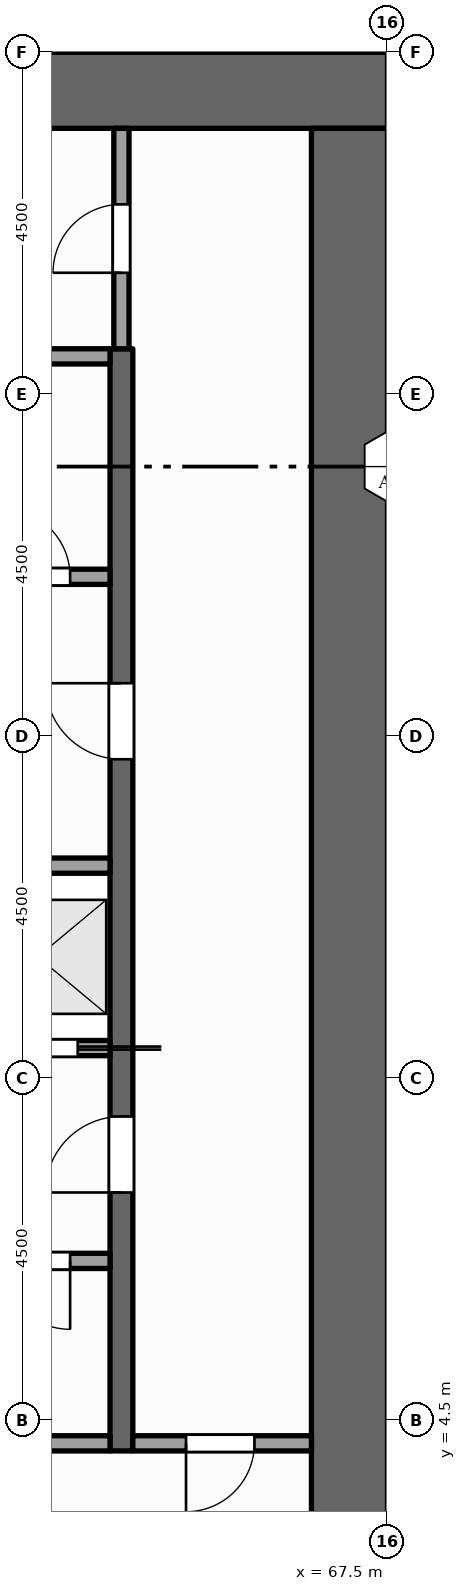
"""IFC4 building model, lengths in metres.
Left out: names, types, materials, properties, quantities, classifications, styles, units other than length and angle.
Written with IfcOpenShell. Run it as: python <this file> out.ifc"""

import sys

from ifc_helpers import new_model, si_unit, direction, frame, frame_2d, origin, place, context, subcontext, project, spatial, rectangle, extrude, element, fill, save


model = new_model("IFC4")
c1 = context("Model", 3, precision=1e-05, world=origin(), true_north=direction((0.0, 1.0)))
c2 = subcontext(c1, "Body", "Model", "MODEL_VIEW")
j1 = project(units=[si_unit("LENGTHUNIT", "METRE"), si_unit("PLANEANGLEUNIT", "RADIAN")], contexts=[c1])
p1 = place(None, origin())
s1 = spatial("IfcSite", under=j1, at=p1, CompositionType="ELEMENT")
p2 = place(p1, origin())
s2 = spatial("IfcBuilding", under=s1, at=p2, CompositionType="ELEMENT")
p3 = place(p2, frame((0.0, 0.0, 195.0)))
s3 = spatial("IfcBuildingStorey", under=s2, at=p3, CompositionType="ELEMENT", Elevation=195.0)
p4 = place(p3, frame((54.0, 22.0, -0.15), z_axis=(0.0, 0.0, 1.0), x_axis=(1.0, 0.0, 0.0)))
e1 = element("IfcWall", 1, at=p4, inside=s3, PredefinedType="SHEAR", context=c2, shape_type="SweptSolid", body=[
    extrude(rectangle(XDim=13.5, YDim=1.0, at=frame_2d((6.75, 0.0))), origin(), (0.0, 0.0, 1.0), 4.0),
])
p5 = place(p3, frame((67.0, 1.0, -0.15), z_axis=(0.0, 0.0, 1.0), x_axis=(0.0, 1.0, 0.0)))
e2 = element("IfcWall", 2, at=p5, inside=s3, PredefinedType="SHEAR", context=c2, shape_type="SweptSolid", body=[
    extrude(rectangle(XDim=20.5, YDim=1.0, at=frame_2d((10.25, 0.0))), origin(), (0.0, 0.0, 1.0), 4.0),
])
p6 = place(p3, frame((64.0, 4.1, 0.0), z_axis=(0.0, 0.0, 1.0), x_axis=(0.0, 1.0, 0.0)))
e3 = element("IfcWall", 3, at=p6, inside=s3, PredefinedType="SHEAR", context=c2, shape_type="SweptSolid", body=[
    extrude(rectangle(XDim=14.5, YDim=0.3, at=frame_2d((7.25, 0.0))), origin(), (0.0, 0.0, 1.0), 3.85),
])
p7 = place(p6, frame((3.4, 0.0, 0.0)))
e4 = element("IfcOpeningElement", 4, at=p7, cuts=e3, PredefinedType="OPENING", context=c2, shape_type="SweptSolid", body=[
    extrude(rectangle(XDim=1.0, YDim=2.1, at=frame_2d((0.5, 1.05))), frame((0.0, 0.16, 0.0), z_axis=(0.0, -1.0, 0.0), x_axis=(1.0, 0.0, 0.0)), (0.0, 0.0, 1.0), 0.32),
])
p8 = place(p6, frame((9.1, 0.0, 0.0)))
e5 = element("IfcOpeningElement", 5, at=p8, cuts=e3, PredefinedType="OPENING", context=c2, shape_type="SweptSolid", body=[
    extrude(rectangle(XDim=1.0, YDim=2.1, at=frame_2d((0.5, 1.05))), frame((0.0, 0.16, 0.0), z_axis=(0.0, -1.0, 0.0), x_axis=(1.0, 0.0, 0.0)), (0.0, 0.0, 1.0), 0.32),
])
p9 = place(p3, frame((64.0, 18.6, 0.0), z_axis=(0.0, 0.0, 1.0), x_axis=(0.0, 1.0, 0.0)))
e6 = element("IfcWall", 6, at=p9, inside=s3, PredefinedType="PARTITIONING", context=c2, shape_type="SweptSolid", body=[
    extrude(rectangle(XDim=2.9, YDim=0.2, at=frame_2d((1.45, 0.0))), origin(), (0.0, 0.0, 1.0), 3.85),
])
p10 = place(p9, frame((1.0, 0.0, 0.0)))
e7 = element("IfcOpeningElement", 7, at=p10, cuts=e6, PredefinedType="OPENING", context=c2, shape_type="SweptSolid", body=[
    extrude(rectangle(XDim=0.9, YDim=2.1, at=frame_2d((0.45, 1.05))), frame((0.0, 0.11, 0.0), z_axis=(0.0, -1.0, 0.0), x_axis=(1.0, 0.0, 0.0)), (0.0, 0.0, 1.0), 0.22),
])
p11 = place(p3, frame((61.9, 4.2, 0.0), z_axis=(0.0, 0.0, 1.0), x_axis=(1.0, 0.0, 0.0)))
e8 = element("IfcWall", 8, at=p11, inside=s3, PredefinedType="PARTITIONING", context=c2, shape_type="SweptSolid", body=[
    extrude(rectangle(XDim=1.95, YDim=0.2, at=frame_2d((0.975, 0.0))), origin(), (0.0, 0.0, 1.0), 3.85),
])
p12 = place(p3, frame((64.15, 4.2, 0.0), z_axis=(0.0, 0.0, 1.0), x_axis=(1.0, 0.0, 0.0)))
e9 = element("IfcWall", 9, at=p12, inside=s3, PredefinedType="PARTITIONING", context=c2, shape_type="SweptSolid", body=[
    extrude(rectangle(XDim=2.35, YDim=0.2, at=frame_2d((1.175, 0.0))), origin(), (0.0, 0.0, 1.0), 3.85),
])
p13 = place(p12, frame((0.7, 0.0, 0.0)))
e10 = element("IfcOpeningElement", 10, at=p13, cuts=e9, PredefinedType="OPENING", context=c2, shape_type="SweptSolid", body=[
    extrude(rectangle(XDim=0.9, YDim=2.1, at=frame_2d((0.45, 1.05))), frame((0.0, 0.11, 0.0), z_axis=(0.0, -1.0, 0.0), x_axis=(1.0, 0.0, 0.0)), (0.0, 0.0, 1.0), 0.22),
])
p14 = place(p3, frame((61.9, 6.6, 0.0), z_axis=(0.0, 0.0, 1.0), x_axis=(1.0, 0.0, 0.0)))
e11 = element("IfcWall", 11, at=p14, inside=s3, PredefinedType="PARTITIONING", context=c2, shape_type="SweptSolid", body=[
    extrude(rectangle(XDim=1.95, YDim=0.2, at=frame_2d((0.975, 0.0))), origin(), (0.0, 0.0, 1.0), 3.85),
])
p15 = place(p14, frame((0.525, 0.0, 0.0)))
e12 = element("IfcOpeningElement", 12, at=p15, cuts=e11, PredefinedType="OPENING", context=c2, shape_type="SweptSolid", body=[
    extrude(rectangle(XDim=0.9, YDim=2.1, at=frame_2d((0.45, 1.05))), frame((0.0, 0.11, 0.0), z_axis=(0.0, -1.0, 0.0), x_axis=(1.0, 0.0, 0.0)), (0.0, 0.0, 1.0), 0.22),
])
p16 = place(p3, frame((61.9, 9.4, 0.0), z_axis=(0.0, 0.0, 1.0), x_axis=(1.0, 0.0, 0.0)))
e13 = element("IfcWall", 13, at=p16, inside=s3, PredefinedType="SOLIDWALL", context=c2, shape_type="SweptSolid", body=[
    extrude(rectangle(XDim=1.95, YDim=0.2, at=frame_2d((0.975, 0.0))), origin(), (0.0, 0.0, 1.0), 3.85),
])
p17 = place(p16, frame((0.425, 0.0, 0.012)))
e14 = element("IfcOpeningElement", 14, at=p17, cuts=e13, PredefinedType="OPENING", context=c2, shape_type="SweptSolid", body=[
    extrude(rectangle(XDim=1.1, YDim=2.1, at=frame_2d((0.55, 1.05))), frame((0.0, 0.11, 0.0), z_axis=(0.0, -1.0, 0.0), x_axis=(1.0, 0.0, 0.0)), (0.0, 0.0, 1.0), 0.22),
])
p18 = place(p3, frame((61.9, 11.8, 0.0), z_axis=(0.0, 0.0, 1.0), x_axis=(1.0, 0.0, 0.0)))
e15 = element("IfcWall", 15, at=p18, inside=s3, PredefinedType="SOLIDWALL", context=c2, shape_type="SweptSolid", body=[
    extrude(rectangle(XDim=1.95, YDim=0.2, at=frame_2d((0.975, 0.0))), origin(), (0.0, 0.0, 1.0), 3.85),
])
p19 = place(p3, frame((61.9, 15.6, 0.0), z_axis=(0.0, 0.0, 1.0), x_axis=(1.0, 0.0, 0.0)))
e16 = element("IfcWall", 16, at=p19, inside=s3, PredefinedType="PARTITIONING", context=c2, shape_type="SweptSolid", body=[
    extrude(rectangle(XDim=1.95, YDim=0.2, at=frame_2d((0.975, 0.0))), origin(), (0.0, 0.0, 1.0), 3.85),
])
p20 = place(p19, frame((0.525, 0.0, 0.0)))
e17 = element("IfcOpeningElement", 17, at=p20, cuts=e16, PredefinedType="OPENING", context=c2, shape_type="SweptSolid", body=[
    extrude(rectangle(XDim=0.9, YDim=2.1, at=frame_2d((0.45, 1.05))), frame((0.0, 0.11, 0.0), z_axis=(0.0, -1.0, 0.0), x_axis=(1.0, 0.0, 0.0)), (0.0, 0.0, 1.0), 0.22),
])
p21 = place(p3, frame((61.9, 18.5, 0.0), z_axis=(0.0, 0.0, 1.0), x_axis=(1.0, 0.0, 0.0)))
e18 = element("IfcWall", 18, at=p21, inside=s3, PredefinedType="PARTITIONING", context=c2, shape_type="SweptSolid", body=[
    extrude(rectangle(XDim=1.95, YDim=0.2, at=frame_2d((0.975, 0.0))), origin(), (0.0, 0.0, 1.0), 3.85),
])
p22 = place(p17, origin())
e19 = element("IfcDoor", 19, at=p22, inside=s3, OperationType="SLIDING_TO_RIGHT", PredefinedType="DOOR", context=c2, shape_type="SweptSolid", body=[
    extrude(rectangle(XDim=1.1, YDim=2.1, at=frame_2d((0.55, 1.05))), frame((0.0, 0.025, 0.0), z_axis=(0.0, -1.0, 0.0), x_axis=(1.0, 0.0, 0.0)), (0.0, 0.0, 1.0), 0.05),
])
fill(e14, e19)
p23 = place(p7, origin())
e20 = element("IfcDoor", 20, at=p23, inside=s3, OperationType="SINGLE_SWING_LEFT", PredefinedType="DOOR", context=c2, shape_type="SweptSolid", body=[
    extrude(rectangle(XDim=1.0, YDim=2.1, at=frame_2d((0.5, 1.05))), frame((0.0, 0.025, 0.0), z_axis=(0.0, -1.0, 0.0), x_axis=(1.0, 0.0, 0.0)), (0.0, 0.0, 1.0), 0.05),
])
fill(e4, e20)
p24 = place(p8, origin())
e21 = element("IfcDoor", 21, at=p24, inside=s3, OperationType="SINGLE_SWING_RIGHT", PredefinedType="DOOR", context=c2, shape_type="SweptSolid", body=[
    extrude(rectangle(XDim=1.0, YDim=2.1, at=frame_2d((0.5, 1.05))), frame((0.0, 0.025, 0.0), z_axis=(0.0, -1.0, 0.0), x_axis=(1.0, 0.0, 0.0)), (0.0, 0.0, 1.0), 0.05),
])
fill(e5, e21)
p25 = place(p13, origin())
e22 = element("IfcDoor", 22, at=p25, inside=s3, OperationType="SINGLE_SWING_LEFT", PredefinedType="DOOR", context=c2, shape_type="SweptSolid", body=[
    extrude(rectangle(XDim=0.9, YDim=2.1, at=frame_2d((0.45, 1.05))), frame((0.0, 0.025, 0.0), z_axis=(0.0, -1.0, 0.0), x_axis=(1.0, 0.0, 0.0)), (0.0, 0.0, 1.0), 0.05),
])
fill(e10, e22)
p26 = place(p10, origin())
e23 = element("IfcDoor", 23, at=p26, inside=s3, OperationType="SINGLE_SWING_LEFT", PredefinedType="DOOR", context=c2, shape_type="SweptSolid", body=[
    extrude(rectangle(XDim=0.9, YDim=2.1, at=frame_2d((0.45, 1.05))), frame((0.0, 0.025, 0.0), z_axis=(0.0, -1.0, 0.0), x_axis=(1.0, 0.0, 0.0)), (0.0, 0.0, 1.0), 0.05),
])
fill(e7, e23)
p27 = place(p15, origin())
e24 = element("IfcDoor", 24, at=p27, inside=s3, OperationType="SINGLE_SWING_RIGHT", PredefinedType="DOOR", context=c2, shape_type="SweptSolid", body=[
    extrude(rectangle(XDim=0.9, YDim=2.1, at=frame_2d((0.45, 1.05))), frame((0.0, 0.025, 0.0), z_axis=(0.0, -1.0, 0.0), x_axis=(1.0, 0.0, 0.0)), (0.0, 0.0, 1.0), 0.05),
])
fill(e12, e24)
p28 = place(p20, origin())
e25 = element("IfcDoor", 25, at=p28, inside=s3, OperationType="SINGLE_SWING_LEFT", PredefinedType="DOOR", context=c2, shape_type="SweptSolid", body=[
    extrude(rectangle(XDim=0.9, YDim=2.1, at=frame_2d((0.45, 1.05))), frame((0.0, 0.025, 0.0), z_axis=(0.0, -1.0, 0.0), x_axis=(1.0, 0.0, 0.0)), (0.0, 0.0, 1.0), 0.05),
])
fill(e17, e25)
save(model, sys.argv[1])
